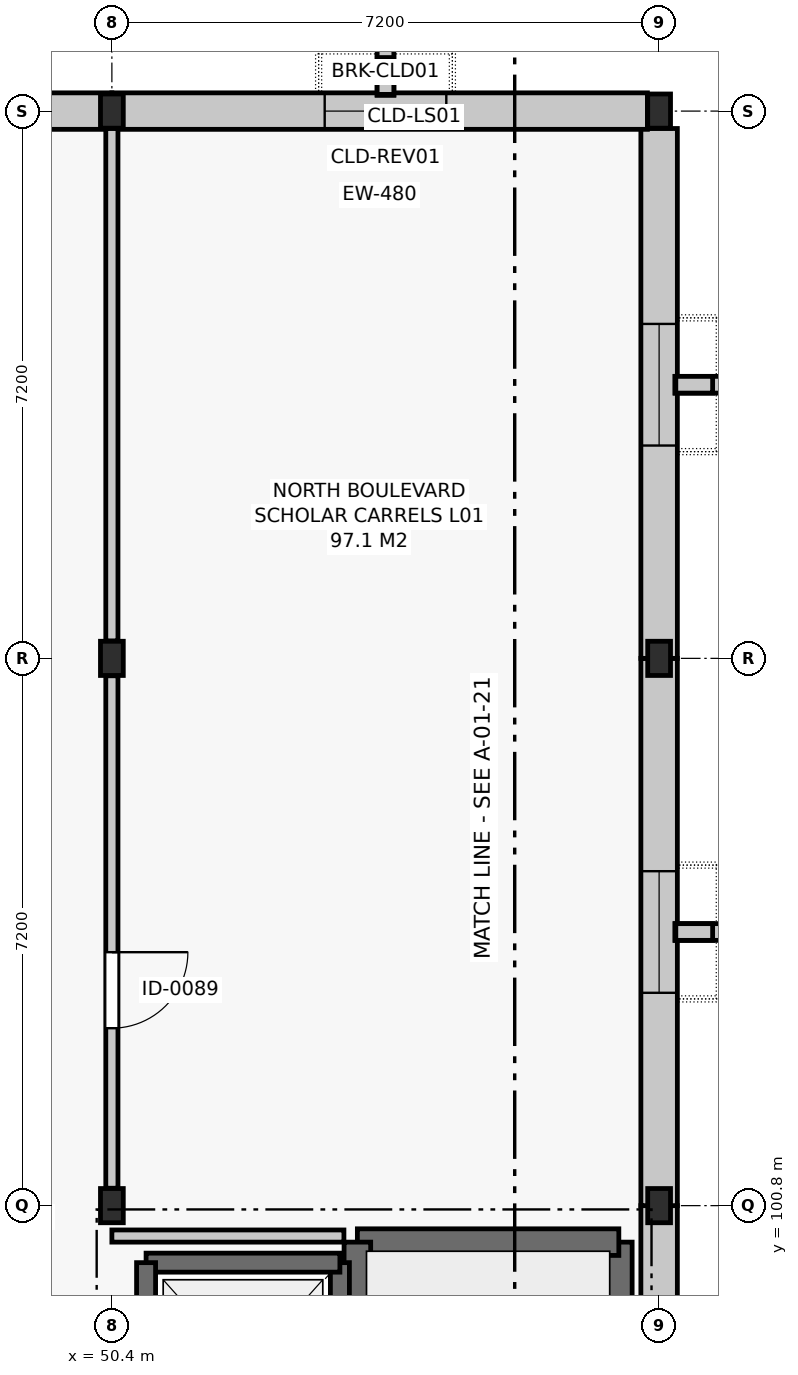
"""IFC4 building model, lengths in metres.
Left out: names, types, materials, properties, quantities, classifications, styles, units other than length and angle.
Written with IfcOpenShell. Run it as: python <this file> out.ifc"""

import sys

from ifc_helpers import new_model, si_unit, direction, frame, frame_2d, origin, origin_2d, place, context, subcontext, project, spatial, rectangle, i_section, extrude, element, fill, save


model = new_model("IFC4")
c1 = context("Model", 3, precision=1e-05, world=origin(), true_north=direction((0.0, 1.0)))
c2 = subcontext(c1, "Body", "Model", "MODEL_VIEW")
j1 = project(units=[si_unit("LENGTHUNIT", "METRE"), si_unit("PLANEANGLEUNIT", "RADIAN")], contexts=[c1])
p1 = place(None, origin())
s1 = spatial("IfcSite", under=j1, at=p1, CompositionType="ELEMENT")
p2 = place(p1, origin())
s2 = spatial("IfcBuilding", under=s1, at=p2, CompositionType="ELEMENT")
p3 = place(p2, frame((0.0, 0.0, 5.4)))
s3 = spatial("IfcBuildingStorey", under=s2, at=p3, CompositionType="ELEMENT", Elevation=5.4)
for number, where, z_axis, x_axis in (
    (1, (50.4, 100.8, 0.0), (0.0, 0.0, 1.0), (1.0, 0.0, 0.0)),
    (2, (50.4, 108.0, 0.0), (0.0, 0.0, 1.0), (1.0, 0.0, 0.0)),
    (3, (50.4, 115.2, 0.0), (0.0, 0.0, 1.0), (1.0, 0.0, 0.0)),
    (4, (57.6, 100.8, 0.0), (0.0, 0.0, 1.0), (1.0, 0.0, 0.0)),
    (5, (57.6, 108.0, 0.0), (0.0, 0.0, 1.0), (1.0, 0.0, 0.0)),
    (6, (57.6, 115.2, 0.0), (0.0, 0.0, 1.0), (1.0, 0.0, 0.0)),
):
    element("IfcColumn", number, at=place(p3, frame(where, z_axis=z_axis, x_axis=x_axis)), inside=s3, PredefinedType="COLUMN", context=c2, shape_type="SweptSolid", body=[
        extrude(i_section(OverallWidth=0.3, OverallDepth=0.45, WebThickness=0.014, FlangeThickness=0.026, FilletRadius=0.027, at=origin_2d()), origin(), (0.0, 0.0, 1.0), 4.8),
    ])
p4 = place(p3, frame((57.6, 93.6, 0.0), z_axis=(0.0, 0.0, 1.0), x_axis=(0.0, 1.0, 0.0)))
e7 = element("IfcWall", 7, at=p4, inside=s3, PredefinedType="SOLIDWALL", context=c2, shape_type="SweptSolid", body=[
    extrude(rectangle(XDim=7.2, YDim=0.48, at=frame_2d((3.6, 0.0))), origin(), (0.0, 0.0, 1.0), 3.8),
])
p5 = place(p4, frame((2.8, 0.0, 0.95)))
e8 = element("IfcOpeningElement", 8, at=p5, cuts=e7, PredefinedType="OPENING", context=c2, shape_type="SweptSolid", body=[
    extrude(rectangle(XDim=1.6, YDim=2.2, at=frame_2d((0.8, 1.1))), frame((0.0, 0.252, 0.0), z_axis=(0.0, -1.0, 0.0), x_axis=(1.0, 0.0, 0.0)), (0.0, 0.0, 1.0), 0.504),
])
p6 = place(p3, frame((57.6, 100.8, 0.0), z_axis=(0.0, 0.0, 1.0), x_axis=(0.0, 1.0, 0.0)))
e9 = element("IfcWall", 9, at=p6, inside=s3, PredefinedType="SOLIDWALL", context=c2, shape_type="SweptSolid", body=[
    extrude(rectangle(XDim=7.2, YDim=0.48, at=frame_2d((3.6, 0.0))), origin(), (0.0, 0.0, 1.0), 3.8),
])
p7 = place(p6, frame((2.8, 0.0, 0.95)))
e10 = element("IfcOpeningElement", 10, at=p7, cuts=e9, PredefinedType="OPENING", context=c2, shape_type="SweptSolid", body=[
    extrude(rectangle(XDim=1.6, YDim=2.2, at=frame_2d((0.8, 1.1))), frame((0.0, 0.252, 0.0), z_axis=(0.0, -1.0, 0.0), x_axis=(1.0, 0.0, 0.0)), (0.0, 0.0, 1.0), 0.504),
])
p8 = place(p3, frame((57.6, 108.0, 0.0), z_axis=(0.0, 0.0, 1.0), x_axis=(0.0, 1.0, 0.0)))
e11 = element("IfcWall", 11, at=p8, inside=s3, PredefinedType="SOLIDWALL", context=c2, shape_type="SweptSolid", body=[
    extrude(rectangle(XDim=6.971, YDim=0.48, at=frame_2d((3.485, 0.0))), origin(), (0.0, 0.0, 1.0), 3.8),
])
p9 = place(p8, frame((2.8, 0.0, 0.95)))
e12 = element("IfcOpeningElement", 12, at=p9, cuts=e11, PredefinedType="OPENING", context=c2, shape_type="SweptSolid", body=[
    extrude(rectangle(XDim=1.6, YDim=2.2, at=frame_2d((0.8, 1.1))), frame((0.0, 0.252, 0.0), z_axis=(0.0, -1.0, 0.0), x_axis=(1.0, 0.0, 0.0)), (0.0, 0.0, 1.0), 0.504),
])
p10 = place(p3, frame((57.446, 115.2, 0.0), z_axis=(0.0, 0.0, 1.0), x_axis=(-1.0, 0.0, 0.0)))
e13 = element("IfcWall", 13, at=p10, inside=s3, PredefinedType="SOLIDWALL", context=c2, shape_type="SweptSolid", body=[
    extrude(rectangle(XDim=7.046, YDim=0.48, at=frame_2d((3.523, 0.0))), origin(), (0.0, 0.0, 1.0), 3.8),
])
p11 = place(p10, frame((2.646, 0.0, 0.95)))
e14 = element("IfcOpeningElement", 14, at=p11, cuts=e13, PredefinedType="OPENING", context=c2, shape_type="SweptSolid", body=[
    extrude(rectangle(XDim=1.6, YDim=2.2, at=frame_2d((0.8, 1.1))), frame((0.0, 0.252, 0.0), z_axis=(0.0, -1.0, 0.0), x_axis=(1.0, 0.0, 0.0)), (0.0, 0.0, 1.0), 0.504),
])
p12 = place(p3, frame((50.4, 115.2, 0.0), z_axis=(0.0, 0.0, 1.0), x_axis=(-1.0, 0.0, 0.0)))
e15 = element("IfcWall", 15, at=p12, inside=s3, PredefinedType="SOLIDWALL", context=c2, shape_type="SweptSolid", body=[
    extrude(rectangle(XDim=7.2, YDim=0.48, at=frame_2d((3.6, 0.0))), origin(), (0.0, 0.0, 1.0), 3.8),
])
p13 = place(p3, frame((57.07, 93.18, 0.0), z_axis=(0.0, 0.0, 1.0), x_axis=(0.0, 1.0, 0.0)))
e16 = element("IfcWall", 16, at=p13, inside=s3, PredefinedType="SHEAR", context=c2, shape_type="SweptSolid", body=[
    extrude(rectangle(XDim=7.14, YDim=0.35, at=frame_2d((3.57, 0.0))), origin(), (0.0, 0.0, 1.0), 4.52),
])
p14 = place(p3, frame((57.07, 100.32, 0.0), z_axis=(0.0, 0.0, 1.0), x_axis=(-1.0, 0.0, 0.0)))
e17 = element("IfcWall", 17, at=p14, inside=s3, PredefinedType="SHEAR", context=c2, shape_type="SweptSolid", body=[
    extrude(rectangle(XDim=3.44, YDim=0.35, at=frame_2d((1.72, 0.0))), origin(), (0.0, 0.0, 1.0), 4.52),
])
p15 = place(p3, frame((53.63, 100.32, 0.0), z_axis=(0.0, 0.0, 1.0), x_axis=(0.0, -1.0, 0.0)))
e18 = element("IfcWall", 18, at=p15, inside=s3, PredefinedType="SHEAR", context=c2, shape_type="SweptSolid", body=[
    extrude(rectangle(XDim=7.14, YDim=0.35, at=frame_2d((3.57, 0.0))), origin(), (0.0, 0.0, 1.0), 4.52),
])
p16 = place(p3, frame((53.4, 97.25, 0.0), z_axis=(0.0, 0.0, 1.0), x_axis=(0.0, 1.0, 0.0)))
e19 = element("IfcWall", 19, at=p16, inside=s3, PredefinedType="SHEAR", context=c2, shape_type="SweptSolid", body=[
    extrude(rectangle(XDim=2.8, YDim=0.25, at=frame_2d((1.4, 0.0))), origin(), (0.0, 0.0, 1.0), 4.52),
])
p17 = place(p3, frame((53.4, 100.05, 0.0), z_axis=(0.0, 0.0, 1.0), x_axis=(-1.0, 0.0, 0.0)))
e20 = element("IfcWall", 20, at=p17, inside=s3, PredefinedType="SHEAR", context=c2, shape_type="SweptSolid", body=[
    extrude(rectangle(XDim=2.55, YDim=0.25, at=frame_2d((1.275, 0.0))), origin(), (0.0, 0.0, 1.0), 4.52),
])
p18 = place(p3, frame((50.85, 100.05, 0.0), z_axis=(0.0, 0.0, 1.0), x_axis=(0.0, -1.0, 0.0)))
e21 = element("IfcWall", 21, at=p18, inside=s3, PredefinedType="SHEAR", context=c2, shape_type="SweptSolid", body=[
    extrude(rectangle(XDim=2.8, YDim=0.25, at=frame_2d((1.4, 0.0))), origin(), (0.0, 0.0, 1.0), 4.52),
])
p19 = place(p3, frame((50.4, 100.4, 0.0), z_axis=(0.0, 0.0, 1.0), x_axis=(1.0, 0.0, 0.0)))
e22 = element("IfcWall", 22, at=p19, inside=s3, PredefinedType="PARTITIONING", context=c2, shape_type="SweptSolid", body=[
    extrude(rectangle(XDim=3.053, YDim=0.16, at=frame_2d((1.526, 0.0))), origin(), (0.0, 0.0, 1.0), 4.065),
])
p20 = place(p3, frame((50.4, 101.029, 0.0), z_axis=(0.0, 0.0, 1.0), x_axis=(0.0, 1.0, 0.0)))
e23 = element("IfcWall", 23, at=p20, inside=s3, PredefinedType="PARTITIONING", context=c2, shape_type="SweptSolid", body=[
    extrude(rectangle(XDim=6.742, YDim=0.16, at=frame_2d((3.371, 0.0))), origin(), (0.0, 0.0, 1.0), 4.065),
])
p21 = place(p20, frame((2.105, 0.0, 0.0)))
e24 = element("IfcOpeningElement", 24, at=p21, cuts=e23, PredefinedType="OPENING", context=c2, shape_type="SweptSolid", body=[
    extrude(rectangle(XDim=1.0, YDim=2.15, at=frame_2d((0.5, 1.075))), frame((0.0, 0.092, 0.0), z_axis=(0.0, -1.0, 0.0), x_axis=(1.0, 0.0, 0.0)), (0.0, 0.0, 1.0), 0.184),
])
p22 = place(p3, frame((50.4, 108.229, 0.0), z_axis=(0.0, 0.0, 1.0), x_axis=(0.0, 1.0, 0.0)))
e25 = element("IfcWall", 25, at=p22, inside=s3, PredefinedType="PARTITIONING", context=c2, shape_type="SweptSolid", body=[
    extrude(rectangle(XDim=6.742, YDim=0.16, at=frame_2d((3.371, 0.0))), origin(), (0.0, 0.0, 1.0), 4.065),
])
p23 = place(p7, origin())
e26 = element("IfcWindow", 26, at=p23, inside=s3, PartitioningType="SINGLE_PANEL", PredefinedType="WINDOW", context=c2, shape_type="SweptSolid", body=[
    extrude(rectangle(XDim=1.6, YDim=2.2, at=frame_2d((0.8, 1.1))), frame((0.0, 0.03, 0.0), z_axis=(0.0, -1.0, 0.0), x_axis=(1.0, 0.0, 0.0)), (0.0, 0.0, 1.0), 0.06),
])
fill(e10, e26)
p24 = place(p9, origin())
e27 = element("IfcWindow", 27, at=p24, inside=s3, PartitioningType="SINGLE_PANEL", PredefinedType="WINDOW", context=c2, shape_type="SweptSolid", body=[
    extrude(rectangle(XDim=1.6, YDim=2.2, at=frame_2d((0.8, 1.1))), frame((0.0, 0.03, 0.0), z_axis=(0.0, -1.0, 0.0), x_axis=(1.0, 0.0, 0.0)), (0.0, 0.0, 1.0), 0.06),
])
fill(e12, e27)
p25 = place(p11, origin())
e28 = element("IfcWindow", 28, at=p25, inside=s3, PartitioningType="SINGLE_PANEL", PredefinedType="WINDOW", context=c2, shape_type="SweptSolid", body=[
    extrude(rectangle(XDim=1.6, YDim=2.2, at=frame_2d((0.8, 1.1))), frame((0.0, 0.03, 0.0), z_axis=(0.0, -1.0, 0.0), x_axis=(1.0, 0.0, 0.0)), (0.0, 0.0, 1.0), 0.06),
])
fill(e14, e28)
p26 = place(p21, frame((1.0, 0.0, 0.0), z_axis=(0.0, 0.0, 1.0), x_axis=(-1.0, 0.0, 0.0)))
e29 = element("IfcDoor", 29, at=p26, inside=s3, OperationType="SINGLE_SWING_LEFT", PredefinedType="DOOR", context=c2, shape_type="SweptSolid", body=[
    extrude(rectangle(XDim=1.0, YDim=2.15, at=frame_2d((0.5, 1.075))), frame((0.0, 0.025, 0.0), z_axis=(0.0, -1.0, 0.0), x_axis=(1.0, 0.0, 0.0)), (0.0, 0.0, 1.0), 0.05),
])
fill(e24, e29)
save(model, sys.argv[1])
